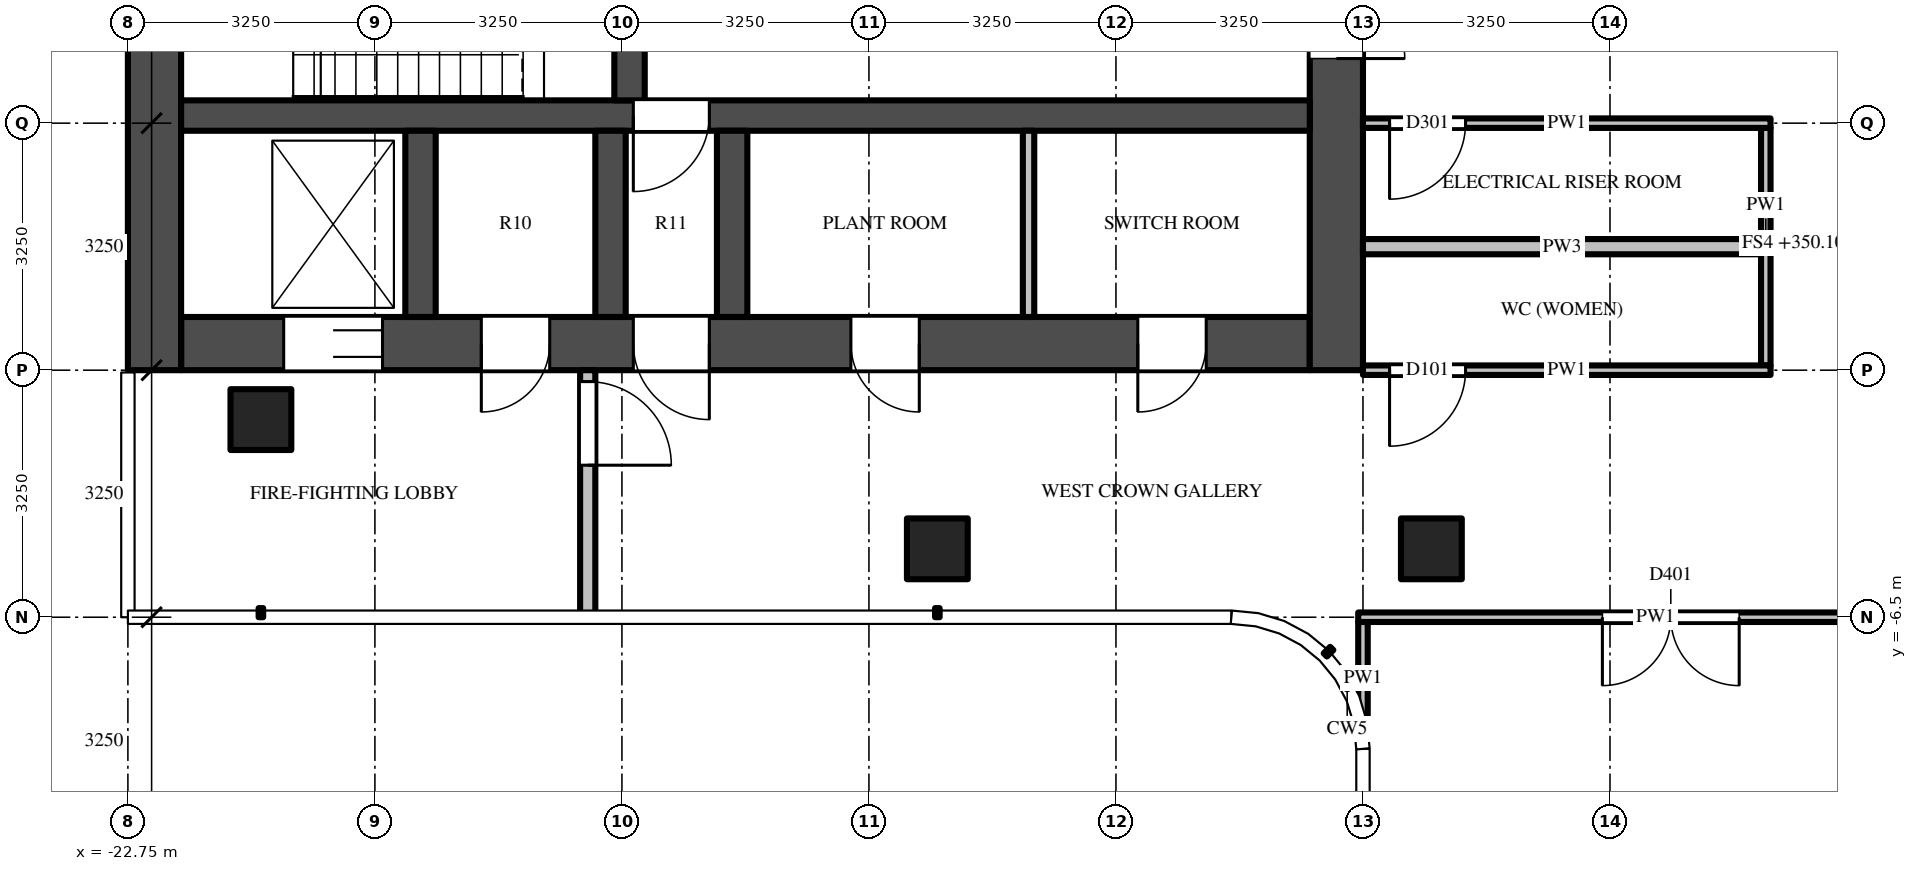
"""IFC4 building model, lengths in metres.
Left out: names, types, materials, properties, quantities, classifications, styles, units other than length and angle.
Written with IfcOpenShell. Run it as: python <this file> out.ifc"""

import sys

from ifc_helpers import new_model, si_unit, direction, frame, frame_2d, origin, origin_2d, place, context, subcontext, project, spatial, rectangle, extrude, source, transform, mapped, element, fill, save


model = new_model("IFC4")
c1 = context("Model", 3, precision=1e-05, world=origin(), true_north=direction((0.0, 1.0)))
c2 = subcontext(c1, "Body", "Model", "MODEL_VIEW")
j1 = project(units=[si_unit("LENGTHUNIT", "METRE"), si_unit("PLANEANGLEUNIT", "RADIAN")], contexts=[c1])
p1 = place(None, origin())
s1 = spatial("IfcSite", under=j1, at=p1, CompositionType="ELEMENT")
p2 = place(p1, origin())
s2 = spatial("IfcBuilding", under=s1, at=p2, CompositionType="ELEMENT")
p3 = place(p2, frame((0.0, 0.0, 350.1)))
s3 = spatial("IfcBuildingStorey", under=s2, at=p3, CompositionType="ELEMENT", Elevation=350.1)
m1 = source(origin(), c2, "Body", "SweptSolid", [
    extrude(rectangle(XDim=0.8, YDim=0.8, at=origin_2d()), origin(), (0.0, 0.0, 1.0), 4.0),
])
for number, where, z_axis, x_axis in (
    (1, (-5.6, -5.6, 0.0), (0.0, 0.0, 1.0), (1.0, 0.0, 0.0)),
    (2, (-12.1, -5.6, 0.0), (0.0, 0.0, 1.0), (1.0, 0.0, 0.0)),
    (3, (-21.0, -3.9, 0.0), (0.0, 0.0, 1.0), (1.0, 0.0, 0.0)),
):
    element("IfcColumn", number, at=place(p3, frame(where, z_axis=z_axis, x_axis=x_axis)), inside=s3, PredefinedType="COLUMN", context=c2, shape_type="MappedRepresentation", body=[
        mapped(m1, transform((0.0, 0.0, 0.0))),
    ])
m2 = source(origin(), c2, "Body", "SweptSolid", [
    extrude(rectangle(XDim=14.85, YDim=0.7, at=frame_2d((7.425, 0.0))), origin(), (0.0, 0.0, 1.0), 3.75),
])
p4 = place(p3, frame((-7.2, -2.9, 0.0), z_axis=(0.0, 0.0, 1.0), x_axis=(-1.0, 0.0, 0.0)))
e4 = element("IfcWall", 4, at=p4, inside=s3, PredefinedType="SHEAR", context=c2, shape_type="MappedRepresentation", body=[
    mapped(m2, transform((0.0, 0.0, 0.0))),
])
m3 = source(origin(), c2, "Body", "SweptSolid", [
    extrude(rectangle(XDim=1.3, YDim=2.1, at=frame_2d((0.65, 1.05))), frame((0.0, 0.36, 0.0), z_axis=(0.0, -1.0, 0.0), x_axis=(1.0, 0.0, 0.0)), (0.0, 0.0, 1.0), 0.72),
])
p5 = place(p4, frame((12.2, 0.0, 0.0)))
e5 = element("IfcOpeningElement", 5, at=p5, cuts=e4, PredefinedType="OPENING", context=c2, shape_type="MappedRepresentation", body=[
    mapped(m3, transform((0.0, 0.0, 0.0))),
])
m4 = source(origin(), c2, "Body", "SweptSolid", [
    extrude(rectangle(XDim=1.0, YDim=2.1, at=frame_2d((0.5, 1.05))), frame((0.0, 0.36, 0.0), z_axis=(0.0, -1.0, 0.0), x_axis=(1.0, 0.0, 0.0)), (0.0, 0.0, 1.0), 0.72),
])
p6 = place(p4, frame((7.9, 0.0, 0.0)))
e6 = element("IfcOpeningElement", 6, at=p6, cuts=e4, PredefinedType="OPENING", context=c2, shape_type="MappedRepresentation", body=[
    mapped(m4, transform((0.0, 0.0, 0.0))),
])
m5 = source(origin(), c2, "Body", "SweptSolid", [
    extrude(rectangle(XDim=0.9, YDim=2.1, at=frame_2d((0.45, 1.05))), frame((0.0, 0.36, 0.0), z_axis=(0.0, -1.0, 0.0), x_axis=(1.0, 0.0, 0.0)), (0.0, 0.0, 1.0), 0.72),
])
p7 = place(p4, frame((1.363, 0.0, 0.0)))
e7 = element("IfcOpeningElement", 7, at=p7, cuts=e4, PredefinedType="OPENING", context=c2, shape_type="MappedRepresentation", body=[
    mapped(m5, transform((0.0, 0.0, 0.0))),
])
p8 = place(p4, frame((5.137, 0.0, 0.0)))
e8 = element("IfcOpeningElement", 8, at=p8, cuts=e4, PredefinedType="OPENING", context=c2, shape_type="MappedRepresentation", body=[
    mapped(m5, transform((0.0, 0.0, 0.0))),
])
p9 = place(p4, frame((10.0, 0.0, 0.0)))
e9 = element("IfcOpeningElement", 9, at=p9, cuts=e4, PredefinedType="OPENING", context=c2, shape_type="MappedRepresentation", body=[
    mapped(m5, transform((0.0, 0.0, 0.0))),
])
m6 = source(origin(), c2, "Body", "SweptSolid", [
    extrude(rectangle(XDim=9.05, YDim=0.7, at=frame_2d((4.525, 0.0))), origin(), (0.0, 0.0, 1.0), 3.75),
])
p10 = place(p3, frame((-6.85, 5.8, 0.0), z_axis=(0.0, 0.0, 1.0), x_axis=(0.0, -1.0, 0.0)))
e10 = element("IfcWall", 10, at=p10, inside=s3, PredefinedType="SHEAR", context=c2, shape_type="MappedRepresentation", body=[
    mapped(m6, transform((0.0, 0.0, 0.0))),
])
m7 = source(origin(), c2, "Body", "SweptSolid", [
    extrude(rectangle(XDim=1.8, YDim=2.1, at=frame_2d((0.9, 1.05))), frame((0.0, 0.36, 0.0), z_axis=(0.0, -1.0, 0.0), x_axis=(1.0, 0.0, 0.0)), (0.0, 0.0, 1.0), 0.72),
])
p11 = place(p10, frame((3.15, 0.0, 0.0)))
e11 = element("IfcOpeningElement", 11, at=p11, cuts=e10, PredefinedType="OPENING", context=c2, shape_type="MappedRepresentation", body=[
    mapped(m7, transform((0.0, 0.0, 0.0))),
])
p12 = place(p3, frame((-22.4, 5.8, 0.0), z_axis=(0.0, 0.0, 1.0), x_axis=(0.0, -1.0, 0.0)))
e12 = element("IfcWall", 12, at=p12, inside=s3, PredefinedType="SHEAR", context=c2, shape_type="MappedRepresentation", body=[
    mapped(m6, transform((0.0, 0.0, 0.0))),
])
m8 = source(origin(), c2, "Body", "SweptSolid", [
    extrude(rectangle(XDim=14.85, YDim=0.4, at=frame_2d((7.425, 0.0))), origin(), (0.0, 0.0, 1.0), 3.75),
])
p13 = place(p3, frame((-7.2, 0.1, 0.0), z_axis=(0.0, 0.0, 1.0), x_axis=(-1.0, 0.0, 0.0)))
e13 = element("IfcWall", 13, at=p13, inside=s3, PredefinedType="SHEAR", context=c2, shape_type="MappedRepresentation", body=[
    mapped(m8, transform((0.0, 0.0, 0.0))),
])
m9 = source(origin(), c2, "Body", "SweptSolid", [
    extrude(rectangle(XDim=1.0, YDim=2.1, at=frame_2d((0.5, 1.05))), frame((0.0, 0.21, 0.0), z_axis=(0.0, -1.0, 0.0), x_axis=(1.0, 0.0, 0.0)), (0.0, 0.0, 1.0), 0.42),
])
p14 = place(p13, frame((7.9, 0.0, 0.0)))
e14 = element("IfcOpeningElement", 14, at=p14, cuts=e13, PredefinedType="OPENING", context=c2, shape_type="MappedRepresentation", body=[
    mapped(m9, transform((0.0, 0.0, 0.0))),
])
m10 = source(origin(), c2, "Body", "SweptSolid", [
    extrude(rectangle(XDim=5.5, YDim=0.4, at=frame_2d((2.75, 0.0))), origin(), (0.0, 0.0, 1.0), 3.75),
])
p15 = place(p3, frame((-16.15, 5.8, 0.0), z_axis=(0.0, 0.0, 1.0), x_axis=(0.0, -1.0, 0.0)))
e15 = element("IfcWall", 15, at=p15, inside=s3, PredefinedType="SHEAR", context=c2, shape_type="MappedRepresentation", body=[
    mapped(m10, transform((0.0, 0.0, 0.0))),
])
m11 = source(origin(), c2, "Body", "SweptSolid", [
    extrude(rectangle(XDim=1.1, YDim=2.1, at=frame_2d((0.55, 1.05))), frame((0.0, 0.21, 0.0), z_axis=(0.0, -1.0, 0.0), x_axis=(1.0, 0.0, 0.0)), (0.0, 0.0, 1.0), 0.42),
])
p16 = place(p15, frame((0.725, 0.0, 0.0)))
e16 = element("IfcOpeningElement", 16, at=p16, cuts=e15, PredefinedType="OPENING", context=c2, shape_type="MappedRepresentation", body=[
    mapped(m11, transform((0.0, 0.0, 0.0))),
])
p17 = place(p15, frame((3.675, 0.0, 0.0)))
e17 = element("IfcOpeningElement", 17, at=p17, cuts=e15, PredefinedType="OPENING", context=c2, shape_type="MappedRepresentation", body=[
    mapped(m11, transform((0.0, 0.0, 0.0))),
])
m12 = source(origin(), c2, "Body", "SweptSolid", [
    extrude(rectangle(XDim=2.45, YDim=0.4, at=frame_2d((1.225, 0.0))), origin(), (0.0, 0.0, 1.0), 3.75),
])
for number, where, z_axis, x_axis in (
    (18, (-14.8, -0.1, 0.0), (0.0, 0.0, 1.0), (0.0, -1.0, 0.0)),
    (19, (-16.4, -0.1, 0.0), (0.0, 0.0, 1.0), (0.0, -1.0, 0.0)),
    (20, (-18.9, -0.1, 0.0), (0.0, 0.0, 1.0), (0.0, -1.0, 0.0)),
):
    element("IfcWall", number, at=place(p3, frame(where, z_axis=z_axis, x_axis=x_axis)), inside=s3, PredefinedType="SHEAR", context=c2, shape_type="MappedRepresentation", body=[
        mapped(m12, transform((0.0, 0.0, 0.0))),
    ])
m13 = source(origin(), c2, "Body", "SweptSolid", [
    extrude(rectangle(XDim=3.25, YDim=0.2, at=frame_2d((1.625, 0.0))), origin(), (0.0, 0.0, 1.0), 3.75),
])
p18 = place(p3, frame((-16.7, -3.25, 0.0), z_axis=(0.0, 0.0, 1.0), x_axis=(0.0, -1.0, 0.0)))
e21 = element("IfcWall", 21, at=p18, inside=s3, PredefinedType="PARTITIONING", context=c2, shape_type="MappedRepresentation", body=[
    mapped(m13, transform((0.0, 0.0, 0.0))),
])
m14 = source(origin(), c2, "Body", "SweptSolid", [
    extrude(rectangle(XDim=1.1, YDim=2.1, at=frame_2d((0.55, 1.05))), frame((0.0, 0.11, 0.0), z_axis=(0.0, -1.0, 0.0), x_axis=(1.0, 0.0, 0.0)), (0.0, 0.0, 1.0), 0.22),
])
p19 = place(p18, frame((0.15, 0.0, 0.0)))
e22 = element("IfcOpeningElement", 22, at=p19, cuts=e21, PredefinedType="OPENING", context=c2, shape_type="MappedRepresentation", body=[
    mapped(m14, transform((0.0, 0.0, 0.0))),
])
m15 = source(origin(), c2, "Body", "SweptSolid", [
    extrude(rectangle(XDim=2.45, YDim=0.15, at=frame_2d((1.225, 0.0))), origin(), (0.0, 0.0, 1.0), 3.75),
])
p20 = place(p3, frame((-10.9, -0.1, 0.0), z_axis=(0.0, 0.0, 1.0), x_axis=(0.0, -1.0, 0.0)))
e23 = element("IfcWall", 23, at=p20, inside=s3, PredefinedType="PARTITIONING", context=c2, shape_type="MappedRepresentation", body=[
    mapped(m15, transform((0.0, 0.0, 0.0))),
])
m16 = source(origin(), c2, "Body", "SweptSolid", [
    extrude(rectangle(XDim=1.469, YDim=0.125, at=frame_2d((0.734, 0.0))), origin(), (0.0, 0.0, 1.0), 3.75),
])
p21 = place(p3, frame((-6.5, -6.562, 0.0), z_axis=(0.0, 0.0, 1.0), x_axis=(0.0, -1.0, 0.0)))
e24 = element("IfcWall", 24, at=p21, inside=s3, PredefinedType="PARTITIONING", context=c2, shape_type="MappedRepresentation", body=[
    mapped(m16, transform((0.0, 0.0, 0.0))),
])
m17 = source(origin(), c2, "Body", "SweptSolid", [
    extrude(rectangle(XDim=3.125, YDim=0.125, at=frame_2d((1.562, 0.0))), origin(), (0.0, 0.0, 1.0), 3.118),
])
p22 = place(p3, frame((-1.2, -0.062, 0.0), z_axis=(0.0, 0.0, 1.0), x_axis=(0.0, -1.0, 0.0)))
e25 = element("IfcWall", 25, at=p22, inside=s3, PredefinedType="PARTITIONING", context=c2, shape_type="MappedRepresentation", body=[
    mapped(m17, transform((0.0, 0.0, 0.0))),
])
m18 = source(origin(), c2, "Body", "SweptSolid", [
    extrude(rectangle(XDim=7.825, YDim=0.125, at=frame_2d((3.913, 0.0))), origin(), (0.0, 0.0, 1.0), 3.75),
])
p23 = place(p3, frame((1.262, -6.5, 0.0), z_axis=(0.0, 0.0, 1.0), x_axis=(-1.0, 0.0, 0.0)))
e26 = element("IfcWall", 26, at=p23, inside=s3, PredefinedType="PARTITIONING", context=c2, shape_type="MappedRepresentation", body=[
    mapped(m18, transform((0.0, 0.0, 0.0))),
])
m19 = source(origin(), c2, "Body", "SweptSolid", [
    extrude(rectangle(XDim=1.8, YDim=2.1, at=frame_2d((0.9, 1.05))), frame((0.0, 0.073, 0.0), z_axis=(0.0, -1.0, 0.0), x_axis=(1.0, 0.0, 0.0)), (0.0, 0.0, 1.0), 0.145),
])
p24 = place(p23, frame((2.812, 0.0, 0.0)))
e27 = element("IfcOpeningElement", 27, at=p24, cuts=e26, PredefinedType="OPENING", context=c2, shape_type="MappedRepresentation", body=[
    mapped(m19, transform((0.0, 0.0, 0.0))),
])
m20 = source(origin(), c2, "Body", "SweptSolid", [
    extrude(rectangle(XDim=5.363, YDim=0.125, at=frame_2d((2.681, 0.0))), origin(), (0.0, 0.0, 1.0), 3.046),
])
p25 = place(p3, frame((-1.137, -3.25, 0.0), z_axis=(0.0, 0.0, 1.0), x_axis=(-1.0, 0.0, 0.0)))
e28 = element("IfcWall", 28, at=p25, inside=s3, PredefinedType="PARTITIONING", context=c2, shape_type="MappedRepresentation", body=[
    mapped(m20, transform((0.0, 0.0, 0.0))),
])
m21 = source(origin(), c2, "Body", "SweptSolid", [
    extrude(rectangle(XDim=1.0, YDim=2.1, at=frame_2d((0.5, 1.05))), frame((0.0, 0.073, 0.0), z_axis=(0.0, -1.0, 0.0), x_axis=(1.0, 0.0, 0.0)), (0.0, 0.0, 1.0), 0.145),
])
p26 = place(p25, frame((4.012, 0.0, 0.0)))
e29 = element("IfcOpeningElement", 29, at=p26, cuts=e28, PredefinedType="OPENING", context=c2, shape_type="MappedRepresentation", body=[
    mapped(m21, transform((0.0, 0.0, 0.0))),
])
m22 = source(origin(), c2, "Body", "SweptSolid", [
    extrude(rectangle(XDim=5.238, YDim=0.2, at=frame_2d((2.619, 0.0))), origin(), (0.0, 0.0, 1.0), 3.046),
])
p27 = place(p3, frame((-6.5, -1.625, 0.0), z_axis=(0.0, 0.0, 1.0), x_axis=(1.0, 0.0, 0.0)))
e30 = element("IfcWall", 30, at=p27, inside=s3, PredefinedType="PARTITIONING", context=c2, shape_type="MappedRepresentation", body=[
    mapped(m22, transform((0.0, 0.0, 0.0))),
])
p28 = place(p3, frame((-1.137, 0.0, 0.0), z_axis=(0.0, 0.0, 1.0), x_axis=(-1.0, 0.0, 0.0)))
e31 = element("IfcWall", 31, at=p28, inside=s3, PredefinedType="PARTITIONING", context=c2, shape_type="MappedRepresentation", body=[
    mapped(m20, transform((0.0, 0.0, 0.0))),
])
p29 = place(p28, frame((4.012, 0.0, 0.0)))
e32 = element("IfcOpeningElement", 32, at=p29, cuts=e31, PredefinedType="OPENING", context=c2, shape_type="MappedRepresentation", body=[
    mapped(m21, transform((0.0, 0.0, 0.0))),
])
m23 = source(origin(), c2, "Body", "SweptSolid", [
    extrude(rectangle(XDim=1.3, YDim=2.1, at=frame_2d((0.65, 1.05))), frame((0.0, -0.275, 0.0), z_axis=(0.0, -1.0, 0.0), x_axis=(1.0, 0.0, 0.0)), (0.0, 0.0, 1.0), 0.05),
])
p30 = place(p5, origin())
e33 = element("IfcDoor", 33, at=p30, inside=s3, OperationType="DOUBLE_DOOR_SLIDING", PredefinedType="DOOR", context=c2, shape_type="MappedRepresentation", body=[
    mapped(m23, transform((0.0, 0.0, 0.0))),
])
fill(e5, e33)
m24 = source(origin(), c2, "Body", "SweptSolid", [
    extrude(rectangle(XDim=1.8, YDim=2.1, at=frame_2d((0.9, 1.05))), frame((0.0, -0.275, 0.0), z_axis=(0.0, -1.0, 0.0), x_axis=(1.0, 0.0, 0.0)), (0.0, 0.0, 1.0), 0.05),
])
p31 = place(p11, origin())
e34 = element("IfcDoor", 34, at=p31, inside=s3, OperationType="DOUBLE_DOOR_SINGLE_SWING", PredefinedType="DOOR", context=c2, shape_type="MappedRepresentation", body=[
    mapped(m24, transform((0.0, 0.0, 0.0))),
])
fill(e11, e34)
m25 = source(origin(), c2, "Body", "SweptSolid", [
    extrude(rectangle(XDim=1.0, YDim=2.1, at=frame_2d((0.5, 1.05))), frame((0.0, 0.025, 0.0), z_axis=(0.0, -1.0, 0.0), x_axis=(1.0, 0.0, 0.0)), (0.0, 0.0, 1.0), 0.05),
])
p32 = place(p14, origin())
e35 = element("IfcDoor", 35, at=p32, inside=s3, OperationType="SINGLE_SWING_RIGHT", PredefinedType="DOOR", context=c2, shape_type="MappedRepresentation", body=[
    mapped(m25, transform((0.0, 0.0, 0.0))),
])
fill(e14, e35)
m26 = source(origin(), c2, "Body", "SweptSolid", [
    extrude(rectangle(XDim=1.0, YDim=2.1, at=frame_2d((0.5, 1.05))), frame((0.0, -0.275, 0.0), z_axis=(0.0, -1.0, 0.0), x_axis=(1.0, 0.0, 0.0)), (0.0, 0.0, 1.0), 0.05),
])
p33 = place(p6, origin())
e36 = element("IfcDoor", 36, at=p33, inside=s3, OperationType="SINGLE_SWING_LEFT", PredefinedType="DOOR", context=c2, shape_type="MappedRepresentation", body=[
    mapped(m26, transform((0.0, 0.0, 0.0))),
])
fill(e6, e36)
m27 = source(origin(), c2, "Body", "SweptSolid", [
    extrude(rectangle(XDim=1.1, YDim=2.1, at=frame_2d((0.55, 1.05))), frame((0.0, 0.025, 0.0), z_axis=(0.0, -1.0, 0.0), x_axis=(1.0, 0.0, 0.0)), (0.0, 0.0, 1.0), 0.05),
])
p34 = place(p19, origin())
e37 = element("IfcDoor", 37, at=p34, inside=s3, OperationType="SINGLE_SWING_RIGHT", PredefinedType="DOOR", context=c2, shape_type="MappedRepresentation", body=[
    mapped(m27, transform((0.0, 0.0, 0.0))),
])
fill(e22, e37)
m28 = source(origin(), c2, "Body", "SweptSolid", [
    extrude(rectangle(XDim=0.9, YDim=2.1, at=frame_2d((0.45, 1.05))), frame((0.0, -0.275, 0.0), z_axis=(0.0, -1.0, 0.0), x_axis=(1.0, 0.0, 0.0)), (0.0, 0.0, 1.0), 0.05),
])
p35 = place(p7, origin())
e38 = element("IfcDoor", 38, at=p35, inside=s3, OperationType="SINGLE_SWING_RIGHT", PredefinedType="DOOR", context=c2, shape_type="MappedRepresentation", body=[
    mapped(m28, transform((0.0, 0.0, 0.0))),
])
fill(e7, e38)
p36 = place(p8, origin())
e39 = element("IfcDoor", 39, at=p36, inside=s3, OperationType="SINGLE_SWING_LEFT", PredefinedType="DOOR", context=c2, shape_type="MappedRepresentation", body=[
    mapped(m28, transform((0.0, 0.0, 0.0))),
])
fill(e8, e39)
p37 = place(p9, origin())
e40 = element("IfcDoor", 40, at=p37, inside=s3, OperationType="SINGLE_SWING_RIGHT", PredefinedType="DOOR", context=c2, shape_type="MappedRepresentation", body=[
    mapped(m28, transform((0.0, 0.0, 0.0))),
])
fill(e9, e40)
m29 = source(origin(), c2, "Body", "SweptSolid", [
    extrude(rectangle(XDim=1.8, YDim=2.1, at=frame_2d((0.9, 1.05))), frame((0.0, 0.025, 0.0), z_axis=(0.0, -1.0, 0.0), x_axis=(1.0, 0.0, 0.0)), (0.0, 0.0, 1.0), 0.05),
])
p38 = place(p24, origin())
e41 = element("IfcDoor", 41, at=p38, inside=s3, OperationType="DOUBLE_DOOR_SINGLE_SWING", PredefinedType="DOOR", context=c2, shape_type="MappedRepresentation", body=[
    mapped(m29, transform((0.0, 0.0, 0.0))),
])
fill(e27, e41)
p39 = place(p26, origin())
e42 = element("IfcDoor", 42, at=p39, inside=s3, OperationType="SINGLE_SWING_RIGHT", PredefinedType="DOOR", context=c2, shape_type="MappedRepresentation", body=[
    mapped(m25, transform((0.0, 0.0, 0.0))),
])
fill(e29, e42)
p40 = place(p29, origin())
e43 = element("IfcDoor", 43, at=p40, inside=s3, OperationType="SINGLE_SWING_RIGHT", PredefinedType="DOOR", context=c2, shape_type="MappedRepresentation", body=[
    mapped(m25, transform((0.0, 0.0, 0.0))),
])
fill(e32, e43)
save(model, sys.argv[1])
